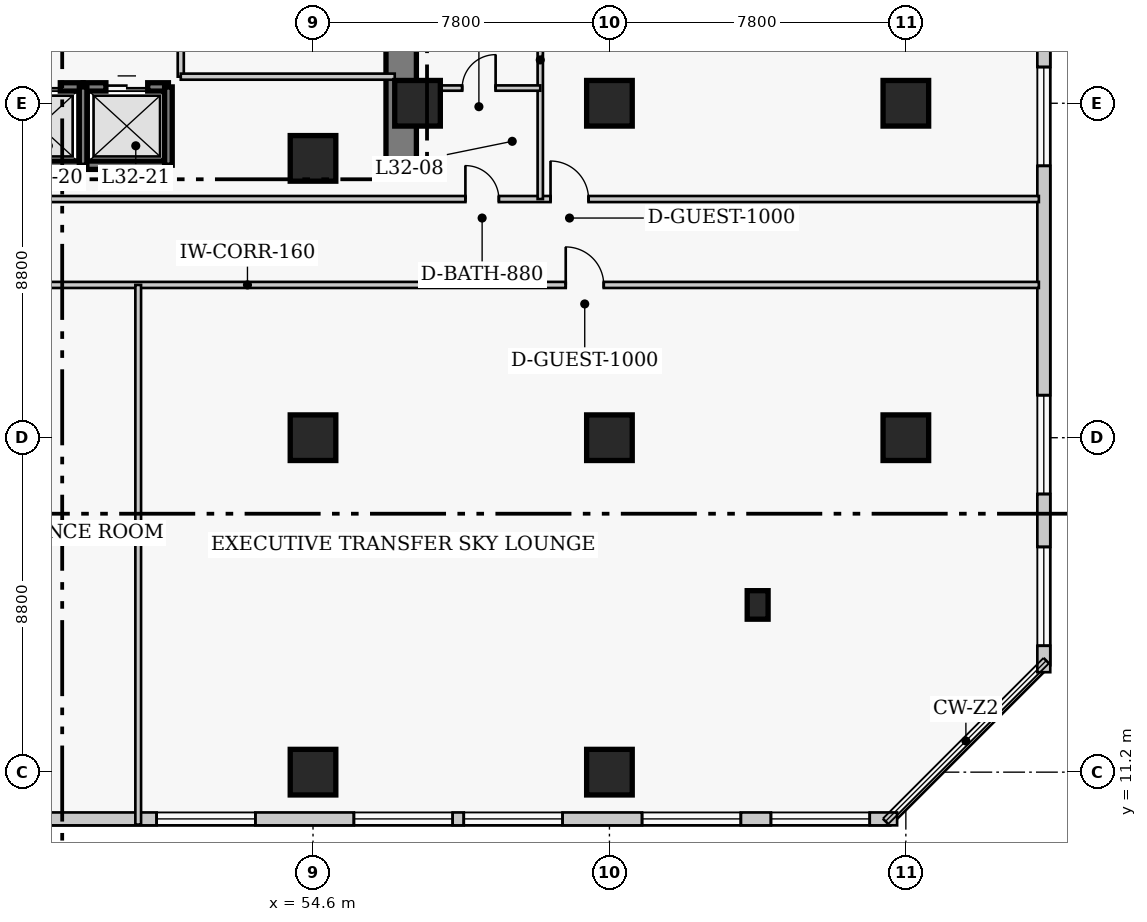
"""IFC4 building model, lengths in metres.
Left out: names, types, materials, properties, quantities, classifications, styles, units other than length and angle.
Written with IfcOpenShell. Run it as: python <this file> out.ifc"""

import sys

from ifc_helpers import new_model, si_unit, direction, frame, frame_2d, origin, origin_2d, place, context, subcontext, project, spatial, rectangle, extrude, element, fill, save


model = new_model("IFC4")
c1 = context("Model", 3, precision=1e-05, world=origin(), true_north=direction((0.0, 1.0)))
c2 = subcontext(c1, "Body", "Model", "MODEL_VIEW")
j1 = project(units=[si_unit("LENGTHUNIT", "METRE"), si_unit("PLANEANGLEUNIT", "RADIAN")], contexts=[c1])
p1 = place(None, origin())
s1 = spatial("IfcSite", under=j1, at=p1, CompositionType="ELEMENT")
p2 = place(p1, origin())
s2 = spatial("IfcBuilding", under=s1, at=p2, CompositionType="ELEMENT")
p3 = place(p2, frame((0.0, 0.0, 129.8)))
s3 = spatial("IfcBuildingStorey", under=s2, at=p3, CompositionType="ELEMENT", Elevation=129.8)
p4 = place(p3, frame((56.92, 27.05, 0.0), z_axis=(0.0, 0.0, 1.0), x_axis=(0.0, 1.0, 0.0)))
e1 = element("IfcWall", 1, at=p4, inside=s3, PredefinedType="SHEAR", context=c2, shape_type="SweptSolid", body=[
    extrude(rectangle(XDim=13.67, YDim=0.8, at=frame_2d((6.835, 0.0))), origin(), (0.0, 0.0, 1.0), 4.8),
])
for number, where, z_axis, x_axis in (
    (2, (54.6, 11.2, 0.0), (0.0, 0.0, 1.0), (1.0, 0.0, 0.0)),
    (3, (54.6, 20.0, 0.0), (0.0, 0.0, 1.0), (1.0, 0.0, 0.0)),
    (4, (62.4, 11.2, 0.0), (0.0, 0.0, 1.0), (1.0, 0.0, 0.0)),
    (5, (62.4, 20.0, 0.0), (0.0, 0.0, 1.0), (1.0, 0.0, 0.0)),
    (6, (62.4, 28.8, 0.0), (0.0, 0.0, 1.0), (1.0, 0.0, 0.0)),
    (7, (70.2, 20.0, 0.0), (0.0, 0.0, 1.0), (1.0, 0.0, 0.0)),
    (8, (70.2, 28.8, 0.0), (0.0, 0.0, 1.0), (1.0, 0.0, 0.0)),
    (9, (57.35, 28.8, 0.0), (0.0, 0.0, 1.0), (1.0, 0.0, 0.0)),
    (10, (54.6, 27.35, 0.0), (0.0, 0.0, 1.0), (1.0, 0.0, 0.0)),
):
    element("IfcColumn", number, at=place(p3, frame(where, z_axis=z_axis, x_axis=x_axis)), inside=s3, PredefinedType="COLUMN", context=c2, shape_type="SweptSolid", body=[
        extrude(rectangle(XDim=1.2, YDim=1.2, at=origin_2d()), origin(), (0.0, 0.0, 1.0), 4.8),
    ])
p5 = place(p3, frame((66.3, 15.6, 0.0), z_axis=(0.0, 0.0, 1.0), x_axis=(1.0, 0.0, 0.0)))
e11 = element("IfcColumn", 11, at=p5, inside=s3, PredefinedType="PILASTER", context=c2, shape_type="SweptSolid", body=[
    extrude(rectangle(XDim=0.55, YDim=0.75, at=origin_2d()), origin(), (0.0, 0.0, 1.0), 4.8),
])
p6 = place(p3, frame((41.68, 9.97, 0.0), z_axis=(0.0, 0.0, 1.0), x_axis=(1.0, 0.0, 0.0)))
e12 = element("IfcWall", 12, at=p6, inside=s3, PredefinedType="SOLIDWALL", context=c2, shape_type="SweptSolid", body=[
    extrude(rectangle(XDim=28.29, YDim=0.34, at=frame_2d((14.145, 0.0))), origin(), (0.0, 0.0, 1.0), 4.55),
])
p7 = place(p6, frame((0.721, 0.0, 0.65)))
e13 = element("IfcOpeningElement", 13, at=p7, cuts=e12, PredefinedType="OPENING", context=c2, shape_type="SweptSolid", body=[
    extrude(rectangle(XDim=2.6, YDim=2.2, at=frame_2d((1.3, 1.1))), frame((0.0, 0.18, 0.0), z_axis=(0.0, -1.0, 0.0), x_axis=(1.0, 0.0, 0.0)), (0.0, 0.0, 1.0), 0.36),
])
p8 = place(p6, frame((8.804, 0.0, 0.65)))
e14 = element("IfcOpeningElement", 14, at=p8, cuts=e12, PredefinedType="OPENING", context=c2, shape_type="SweptSolid", body=[
    extrude(rectangle(XDim=2.6, YDim=2.2, at=frame_2d((1.3, 1.1))), frame((0.0, 0.18, 0.0), z_axis=(0.0, -1.0, 0.0), x_axis=(1.0, 0.0, 0.0)), (0.0, 0.0, 1.0), 0.36),
])
p9 = place(p6, frame((13.995, 0.0, 0.65)))
e15 = element("IfcOpeningElement", 15, at=p9, cuts=e12, PredefinedType="OPENING", context=c2, shape_type="SweptSolid", body=[
    extrude(rectangle(XDim=2.6, YDim=2.2, at=frame_2d((1.3, 1.1))), frame((0.0, 0.18, 0.0), z_axis=(0.0, -1.0, 0.0), x_axis=(1.0, 0.0, 0.0)), (0.0, 0.0, 1.0), 0.36),
])
p10 = place(p6, frame((16.886, 0.0, 0.65)))
e16 = element("IfcOpeningElement", 16, at=p10, cuts=e12, PredefinedType="OPENING", context=c2, shape_type="SweptSolid", body=[
    extrude(rectangle(XDim=2.6, YDim=2.2, at=frame_2d((1.3, 1.1))), frame((0.0, 0.18, 0.0), z_axis=(0.0, -1.0, 0.0), x_axis=(1.0, 0.0, 0.0)), (0.0, 0.0, 1.0), 0.36),
])
p11 = place(p6, frame((21.578, 0.0, 0.65)))
e17 = element("IfcOpeningElement", 17, at=p11, cuts=e12, PredefinedType="OPENING", context=c2, shape_type="SweptSolid", body=[
    extrude(rectangle(XDim=2.6, YDim=2.2, at=frame_2d((1.3, 1.1))), frame((0.0, 0.18, 0.0), z_axis=(0.0, -1.0, 0.0), x_axis=(1.0, 0.0, 0.0)), (0.0, 0.0, 1.0), 0.36),
])
p12 = place(p6, frame((24.969, 0.0, 0.65)))
e18 = element("IfcOpeningElement", 18, at=p12, cuts=e12, PredefinedType="OPENING", context=c2, shape_type="SweptSolid", body=[
    extrude(rectangle(XDim=2.6, YDim=2.2, at=frame_2d((1.3, 1.1))), frame((0.0, 0.18, 0.0), z_axis=(0.0, -1.0, 0.0), x_axis=(1.0, 0.0, 0.0)), (0.0, 0.0, 1.0), 0.36),
])
p13 = place(p3, frame((73.83, 13.83, 0.0), z_axis=(0.0, 0.0, 1.0), x_axis=(0.0, 1.0, 0.0)))
e19 = element("IfcWall", 19, at=p13, inside=s3, PredefinedType="SOLIDWALL", context=c2, shape_type="SweptSolid", body=[
    extrude(rectangle(XDim=31.94, YDim=0.34, at=frame_2d((15.97, 0.0))), origin(), (0.0, 0.0, 1.0), 4.55),
])
p14 = place(p13, frame((0.696, 0.0, 0.65)))
e20 = element("IfcOpeningElement", 20, at=p14, cuts=e19, PredefinedType="OPENING", context=c2, shape_type="SweptSolid", body=[
    extrude(rectangle(XDim=2.6, YDim=2.2, at=frame_2d((1.3, 1.1))), frame((0.0, 0.18, 0.0), z_axis=(0.0, -1.0, 0.0), x_axis=(1.0, 0.0, 0.0)), (0.0, 0.0, 1.0), 0.36),
])
p15 = place(p13, frame((4.689, 0.0, 0.65)))
e21 = element("IfcOpeningElement", 21, at=p15, cuts=e19, PredefinedType="OPENING", context=c2, shape_type="SweptSolid", body=[
    extrude(rectangle(XDim=2.6, YDim=2.2, at=frame_2d((1.3, 1.1))), frame((0.0, 0.18, 0.0), z_axis=(0.0, -1.0, 0.0), x_axis=(1.0, 0.0, 0.0)), (0.0, 0.0, 1.0), 0.36),
])
p16 = place(p13, frame((13.324, 0.0, 0.65)))
e22 = element("IfcOpeningElement", 22, at=p16, cuts=e19, PredefinedType="OPENING", context=c2, shape_type="SweptSolid", body=[
    extrude(rectangle(XDim=2.6, YDim=2.2, at=frame_2d((1.3, 1.1))), frame((0.0, 0.18, 0.0), z_axis=(0.0, -1.0, 0.0), x_axis=(1.0, 0.0, 0.0)), (0.0, 0.0, 1.0), 0.36),
])
p17 = place(p13, frame((16.666, 0.0, 0.65)))
e23 = element("IfcOpeningElement", 23, at=p17, cuts=e19, PredefinedType="OPENING", context=c2, shape_type="SweptSolid", body=[
    extrude(rectangle(XDim=2.6, YDim=2.2, at=frame_2d((1.3, 1.1))), frame((0.0, 0.18, 0.0), z_axis=(0.0, -1.0, 0.0), x_axis=(1.0, 0.0, 0.0)), (0.0, 0.0, 1.0), 0.36),
])
p18 = place(p13, frame((20.659, 0.0, 0.65)))
e24 = element("IfcOpeningElement", 24, at=p18, cuts=e19, PredefinedType="OPENING", context=c2, shape_type="SweptSolid", body=[
    extrude(rectangle(XDim=2.6, YDim=2.2, at=frame_2d((1.3, 1.1))), frame((0.0, 0.18, 0.0), z_axis=(0.0, -1.0, 0.0), x_axis=(1.0, 0.0, 0.0)), (0.0, 0.0, 1.0), 0.36),
])
p19 = place(p13, frame((24.651, 0.0, 0.65)))
e25 = element("IfcOpeningElement", 25, at=p19, cuts=e19, PredefinedType="OPENING", context=c2, shape_type="SweptSolid", body=[
    extrude(rectangle(XDim=2.6, YDim=2.2, at=frame_2d((1.3, 1.1))), frame((0.0, 0.18, 0.0), z_axis=(0.0, -1.0, 0.0), x_axis=(1.0, 0.0, 0.0)), (0.0, 0.0, 1.0), 0.36),
])
p20 = place(p13, frame((28.644, 0.0, 0.65)))
e26 = element("IfcOpeningElement", 26, at=p20, cuts=e19, PredefinedType="OPENING", context=c2, shape_type="SweptSolid", body=[
    extrude(rectangle(XDim=2.6, YDim=2.2, at=frame_2d((1.3, 1.1))), frame((0.0, 0.18, 0.0), z_axis=(0.0, -1.0, 0.0), x_axis=(1.0, 0.0, 0.0)), (0.0, 0.0, 1.0), 0.36),
])
p21 = place(p3, frame((46.25, 29.23, 0.0), z_axis=(0.0, 0.0, 1.0), x_axis=(1.0, 0.0, 0.0)))
e27 = element("IfcWall", 27, at=p21, inside=s3, PredefinedType="SHEAR", context=c2, shape_type="SweptSolid", body=[
    extrude(rectangle(XDim=2.3, YDim=0.22, at=frame_2d((1.15, 0.0))), origin(), (0.0, 0.0, 1.0), 4.8),
])
p22 = place(p21, frame((0.6, 0.0, 0.0)))
e28 = element("IfcOpeningElement", 28, at=p22, cuts=e27, PredefinedType="OPENING", context=c2, shape_type="SweptSolid", body=[
    extrude(rectangle(XDim=1.1, YDim=2.15, at=frame_2d((0.55, 1.075))), frame((0.0, 0.12, 0.0), z_axis=(0.0, -1.0, 0.0), x_axis=(1.0, 0.0, 0.0)), (0.0, 0.0, 1.0), 0.24),
])
p23 = place(p3, frame((46.25, 27.17, 0.0), z_axis=(0.0, 0.0, 1.0), x_axis=(1.0, 0.0, 0.0)))
e29 = element("IfcWall", 29, at=p23, inside=s3, PredefinedType="SHEAR", context=c2, shape_type="SweptSolid", body=[
    extrude(rectangle(XDim=2.3, YDim=0.22, at=frame_2d((1.15, 0.0))), origin(), (0.0, 0.0, 1.0), 4.8),
])
p24 = place(p3, frame((48.55, 29.23, 0.0), z_axis=(0.0, 0.0, 1.0), x_axis=(1.0, 0.0, 0.0)))
e30 = element("IfcWall", 30, at=p24, inside=s3, PredefinedType="SHEAR", context=c2, shape_type="SweptSolid", body=[
    extrude(rectangle(XDim=2.245, YDim=0.22, at=frame_2d((1.123, 0.0))), origin(), (0.0, 0.0, 1.0), 4.8),
])
p25 = place(p24, frame((0.6, 0.0, 0.0)))
e31 = element("IfcOpeningElement", 31, at=p25, cuts=e30, PredefinedType="OPENING", context=c2, shape_type="SweptSolid", body=[
    extrude(rectangle(XDim=1.1, YDim=2.15, at=frame_2d((0.55, 1.075))), frame((0.0, 0.12, 0.0), z_axis=(0.0, -1.0, 0.0), x_axis=(1.0, 0.0, 0.0)), (0.0, 0.0, 1.0), 0.24),
])
p26 = place(p3, frame((48.55, 27.17, 0.0), z_axis=(0.0, 0.0, 1.0), x_axis=(1.0, 0.0, 0.0)))
e32 = element("IfcWall", 32, at=p26, inside=s3, PredefinedType="SHEAR", context=c2, shape_type="SweptSolid", body=[
    extrude(rectangle(XDim=2.245, YDim=0.22, at=frame_2d((1.123, 0.0))), origin(), (0.0, 0.0, 1.0), 4.8),
])
for number, where, z_axis, x_axis in (
    (33, (48.55, 27.17, 0.0), (0.0, 0.0, 1.0), (0.0, 1.0, 0.0)),
    (34, (50.795, 27.17, 0.0), (0.0, 0.0, 1.0), (0.0, 1.0, 0.0)),
):
    element("IfcWall", number, at=place(p3, frame(where, z_axis=z_axis, x_axis=x_axis)), inside=s3, PredefinedType="SHEAR", context=c2, shape_type="SweptSolid", body=[
        extrude(rectangle(XDim=2.06, YDim=0.2, at=frame_2d((1.03, 0.0))), origin(), (0.0, 0.0, 1.0), 4.8),
    ])
p27 = place(p3, frame((51.12, 29.5, 0.0), z_axis=(0.0, 0.0, 1.0), x_axis=(0.0, 1.0, 0.0)))
e35 = element("IfcWall", 35, at=p27, inside=s3, PredefinedType="PARTITIONING", context=c2, shape_type="SweptSolid", body=[
    extrude(rectangle(XDim=3.7, YDim=0.16, at=frame_2d((1.85, 0.0))), origin(), (0.0, 0.0, 1.0), 4.55),
])
p28 = place(p27, frame((0.9, 0.0, 0.0)))
e36 = element("IfcOpeningElement", 36, at=p28, cuts=e35, PredefinedType="OPENING", context=c2, shape_type="SweptSolid", body=[
    extrude(rectangle(XDim=1.1, YDim=2.15, at=frame_2d((0.55, 1.075))), frame((0.0, 0.09, 0.0), z_axis=(0.0, -1.0, 0.0), x_axis=(1.0, 0.0, 0.0)), (0.0, 0.0, 1.0), 0.18),
])
p29 = place(p3, frame((51.12, 29.5, 0.0), z_axis=(0.0, 0.0, 1.0), x_axis=(1.0, 0.0, 0.0)))
e37 = element("IfcWall", 37, at=p29, inside=s3, PredefinedType="PARTITIONING", context=c2, shape_type="SweptSolid", body=[
    extrude(rectangle(XDim=5.63, YDim=0.16, at=frame_2d((2.815, 0.0))), origin(), (0.0, 0.0, 1.0), 4.55),
])
p30 = place(p3, frame((4.3, 24.02, 0.0), z_axis=(0.0, 0.0, 1.0), x_axis=(1.0, 0.0, 0.0)))
e38 = element("IfcWall", 38, at=p30, inside=s3, PredefinedType="PARTITIONING", context=c2, shape_type="SweptSolid", body=[
    extrude(rectangle(XDim=69.4, YDim=0.16, at=frame_2d((34.7, 0.0))), origin(), (0.0, 0.0, 1.0), 4.55),
])
p31 = place(p30, frame((8.45, 0.0, 0.0)))
e39 = element("IfcOpeningElement", 39, at=p31, cuts=e38, PredefinedType="OPENING", context=c2, shape_type="SweptSolid", body=[
    extrude(rectangle(XDim=1.0, YDim=2.15, at=frame_2d((0.5, 1.075))), frame((0.0, 0.09, 0.0), z_axis=(0.0, -1.0, 0.0), x_axis=(1.0, 0.0, 0.0)), (0.0, 0.0, 1.0), 0.18),
])
p32 = place(p30, frame((25.2, 0.0, 0.0)))
e40 = element("IfcOpeningElement", 40, at=p32, cuts=e38, PredefinedType="OPENING", context=c2, shape_type="SweptSolid", body=[
    extrude(rectangle(XDim=1.0, YDim=2.15, at=frame_2d((0.5, 1.075))), frame((0.0, 0.09, 0.0), z_axis=(0.0, -1.0, 0.0), x_axis=(1.0, 0.0, 0.0)), (0.0, 0.0, 1.0), 0.18),
])
p33 = place(p30, frame((39.2, 0.0, 0.0)))
e41 = element("IfcOpeningElement", 41, at=p33, cuts=e38, PredefinedType="OPENING", context=c2, shape_type="SweptSolid", body=[
    extrude(rectangle(XDim=1.0, YDim=2.15, at=frame_2d((0.5, 1.075))), frame((0.0, 0.09, 0.0), z_axis=(0.0, -1.0, 0.0), x_axis=(1.0, 0.0, 0.0)), (0.0, 0.0, 1.0), 0.18),
])
p34 = place(p30, frame((56.95, 0.0, 0.0)))
e42 = element("IfcOpeningElement", 42, at=p34, cuts=e38, PredefinedType="OPENING", context=c2, shape_type="SweptSolid", body=[
    extrude(rectangle(XDim=1.0, YDim=2.15, at=frame_2d((0.5, 1.075))), frame((0.0, 0.09, 0.0), z_axis=(0.0, -1.0, 0.0), x_axis=(1.0, 0.0, 0.0)), (0.0, 0.0, 1.0), 0.18),
])
p35 = place(p3, frame((4.3, 26.28, 0.0), z_axis=(0.0, 0.0, 1.0), x_axis=(1.0, 0.0, 0.0)))
e43 = element("IfcWall", 43, at=p35, inside=s3, PredefinedType="PARTITIONING", context=c2, shape_type="SweptSolid", body=[
    extrude(rectangle(XDim=69.4, YDim=0.16, at=frame_2d((34.7, 0.0))), origin(), (0.0, 0.0, 1.0), 4.55),
])
p36 = place(p35, frame((32.8, 0.0, 0.0)))
e44 = element("IfcOpeningElement", 44, at=p36, cuts=e43, PredefinedType="OPENING", context=c2, shape_type="SweptSolid", body=[
    extrude(rectangle(XDim=1.8, YDim=2.2, at=frame_2d((0.9, 1.1))), frame((0.0, 0.09, 0.0), z_axis=(0.0, -1.0, 0.0), x_axis=(1.0, 0.0, 0.0)), (0.0, 0.0, 1.0), 0.18),
])
p37 = place(p35, frame((8.25, 0.0, 0.0)))
e45 = element("IfcOpeningElement", 45, at=p37, cuts=e43, PredefinedType="OPENING", context=c2, shape_type="SweptSolid", body=[
    extrude(rectangle(XDim=1.0, YDim=2.15, at=frame_2d((0.5, 1.075))), frame((0.0, 0.09, 0.0), z_axis=(0.0, -1.0, 0.0), x_axis=(1.0, 0.0, 0.0)), (0.0, 0.0, 1.0), 0.18),
])
p38 = place(p35, frame((54.31, 0.0, 0.0)))
e46 = element("IfcOpeningElement", 46, at=p38, cuts=e43, PredefinedType="OPENING", context=c2, shape_type="SweptSolid", body=[
    extrude(rectangle(XDim=0.88, YDim=2.05, at=frame_2d((0.44, 1.025))), frame((0.0, 0.09, 0.0), z_axis=(0.0, -1.0, 0.0), x_axis=(1.0, 0.0, 0.0)), (0.0, 0.0, 1.0), 0.18),
])
p39 = place(p35, frame((56.55, 0.0, 0.0)))
e47 = element("IfcOpeningElement", 47, at=p39, cuts=e43, PredefinedType="OPENING", context=c2, shape_type="SweptSolid", body=[
    extrude(rectangle(XDim=1.0, YDim=2.15, at=frame_2d((0.5, 1.075))), frame((0.0, 0.09, 0.0), z_axis=(0.0, -1.0, 0.0), x_axis=(1.0, 0.0, 0.0)), (0.0, 0.0, 1.0), 0.18),
])
p40 = place(p3, frame((50.0, 9.82, 0.0), z_axis=(0.0, 0.0, 1.0), x_axis=(0.0, 1.0, 0.0)))
e48 = element("IfcWall", 48, at=p40, inside=s3, PredefinedType="PARTITIONING", context=c2, shape_type="SweptSolid", body=[
    extrude(rectangle(XDim=14.2, YDim=0.15, at=frame_2d((7.1, 0.0))), origin(), (0.0, 0.0, 1.0), 4.053),
])
p41 = place(p3, frame((60.58, 26.28, 0.0), z_axis=(0.0, 0.0, 1.0), x_axis=(0.0, 1.0, 0.0)))
e49 = element("IfcWall", 49, at=p41, inside=s3, PredefinedType="PLUMBINGWALL", context=c2, shape_type="SweptSolid", body=[
    extrude(rectangle(XDim=7.32, YDim=0.14, at=frame_2d((3.66, 0.0))), origin(), (0.0, 0.0, 1.0), 4.55),
])
p42 = place(p3, frame((57.35, 29.2, 0.0), z_axis=(0.0, 0.0, 1.0), x_axis=(1.0, 0.0, 0.0)))
e50 = element("IfcWall", 50, at=p42, inside=s3, PredefinedType="PLUMBINGWALL", context=c2, shape_type="SweptSolid", body=[
    extrude(rectangle(XDim=3.23, YDim=0.14, at=frame_2d((1.615, 0.0))), origin(), (0.0, 0.0, 1.0), 4.55),
])
p43 = place(p42, frame((1.175, 0.0, 0.0)))
e51 = element("IfcOpeningElement", 51, at=p43, cuts=e50, PredefinedType="OPENING", context=c2, shape_type="SweptSolid", body=[
    extrude(rectangle(XDim=0.88, YDim=2.05, at=frame_2d((0.44, 1.025))), frame((0.0, 0.08, 0.0), z_axis=(0.0, -1.0, 0.0), x_axis=(1.0, 0.0, 0.0)), (0.0, 0.0, 1.0), 0.16),
])
p44 = place(p8, origin())
e52 = element("IfcWindow", 52, at=p44, inside=s3, PartitioningType="SINGLE_PANEL", PredefinedType="WINDOW", context=c2, shape_type="SweptSolid", body=[
    extrude(rectangle(XDim=2.6, YDim=2.2, at=frame_2d((1.3, 1.1))), frame((0.0, 0.03, 0.0), z_axis=(0.0, -1.0, 0.0), x_axis=(1.0, 0.0, 0.0)), (0.0, 0.0, 1.0), 0.06),
])
fill(e14, e52)
p45 = place(p9, origin())
e53 = element("IfcWindow", 53, at=p45, inside=s3, PartitioningType="SINGLE_PANEL", PredefinedType="WINDOW", context=c2, shape_type="SweptSolid", body=[
    extrude(rectangle(XDim=2.6, YDim=2.2, at=frame_2d((1.3, 1.1))), frame((0.0, 0.03, 0.0), z_axis=(0.0, -1.0, 0.0), x_axis=(1.0, 0.0, 0.0)), (0.0, 0.0, 1.0), 0.06),
])
fill(e15, e53)
p46 = place(p10, origin())
e54 = element("IfcWindow", 54, at=p46, inside=s3, PartitioningType="SINGLE_PANEL", PredefinedType="WINDOW", context=c2, shape_type="SweptSolid", body=[
    extrude(rectangle(XDim=2.6, YDim=2.2, at=frame_2d((1.3, 1.1))), frame((0.0, 0.03, 0.0), z_axis=(0.0, -1.0, 0.0), x_axis=(1.0, 0.0, 0.0)), (0.0, 0.0, 1.0), 0.06),
])
fill(e16, e54)
p47 = place(p11, origin())
e55 = element("IfcWindow", 55, at=p47, inside=s3, PartitioningType="SINGLE_PANEL", PredefinedType="WINDOW", context=c2, shape_type="SweptSolid", body=[
    extrude(rectangle(XDim=2.6, YDim=2.2, at=frame_2d((1.3, 1.1))), frame((0.0, 0.03, 0.0), z_axis=(0.0, -1.0, 0.0), x_axis=(1.0, 0.0, 0.0)), (0.0, 0.0, 1.0), 0.06),
])
fill(e17, e55)
p48 = place(p12, origin())
e56 = element("IfcWindow", 56, at=p48, inside=s3, PartitioningType="SINGLE_PANEL", PredefinedType="WINDOW", context=c2, shape_type="SweptSolid", body=[
    extrude(rectangle(XDim=2.6, YDim=2.2, at=frame_2d((1.3, 1.1))), frame((0.0, 0.03, 0.0), z_axis=(0.0, -1.0, 0.0), x_axis=(1.0, 0.0, 0.0)), (0.0, 0.0, 1.0), 0.06),
])
fill(e18, e56)
p49 = place(p14, origin())
e57 = element("IfcWindow", 57, at=p49, inside=s3, PartitioningType="SINGLE_PANEL", PredefinedType="WINDOW", context=c2, shape_type="SweptSolid", body=[
    extrude(rectangle(XDim=2.6, YDim=2.2, at=frame_2d((1.3, 1.1))), frame((0.0, 0.03, 0.0), z_axis=(0.0, -1.0, 0.0), x_axis=(1.0, 0.0, 0.0)), (0.0, 0.0, 1.0), 0.06),
])
fill(e20, e57)
p50 = place(p15, origin())
e58 = element("IfcWindow", 58, at=p50, inside=s3, PartitioningType="SINGLE_PANEL", PredefinedType="WINDOW", context=c2, shape_type="SweptSolid", body=[
    extrude(rectangle(XDim=2.6, YDim=2.2, at=frame_2d((1.3, 1.1))), frame((0.0, 0.03, 0.0), z_axis=(0.0, -1.0, 0.0), x_axis=(1.0, 0.0, 0.0)), (0.0, 0.0, 1.0), 0.06),
])
fill(e21, e58)
p51 = place(p16, origin())
e59 = element("IfcWindow", 59, at=p51, inside=s3, PartitioningType="SINGLE_PANEL", PredefinedType="WINDOW", context=c2, shape_type="SweptSolid", body=[
    extrude(rectangle(XDim=2.6, YDim=2.2, at=frame_2d((1.3, 1.1))), frame((0.0, 0.03, 0.0), z_axis=(0.0, -1.0, 0.0), x_axis=(1.0, 0.0, 0.0)), (0.0, 0.0, 1.0), 0.06),
])
fill(e22, e59)
p52 = place(p22, origin())
e60 = element("IfcDoor", 60, at=p52, inside=s3, OperationType="DOUBLE_DOOR_SLIDING", PredefinedType="DOOR", context=c2, shape_type="SweptSolid", body=[
    extrude(rectangle(XDim=1.1, YDim=2.15, at=frame_2d((0.55, 1.075))), frame((0.0, 0.025, 0.0), z_axis=(0.0, -1.0, 0.0), x_axis=(1.0, 0.0, 0.0)), (0.0, 0.0, 1.0), 0.05),
])
fill(e28, e60)
p53 = place(p25, origin())
e61 = element("IfcDoor", 61, at=p53, inside=s3, OperationType="DOUBLE_DOOR_SLIDING", PredefinedType="DOOR", context=c2, shape_type="SweptSolid", body=[
    extrude(rectangle(XDim=1.1, YDim=2.15, at=frame_2d((0.55, 1.075))), frame((0.0, 0.025, 0.0), z_axis=(0.0, -1.0, 0.0), x_axis=(1.0, 0.0, 0.0)), (0.0, 0.0, 1.0), 0.05),
])
fill(e31, e61)
p54 = place(p34, origin())
e62 = element("IfcDoor", 62, at=p54, inside=s3, OperationType="SINGLE_SWING_LEFT", PredefinedType="DOOR", context=c2, shape_type="SweptSolid", body=[
    extrude(rectangle(XDim=1.0, YDim=2.15, at=frame_2d((0.5, 1.075))), frame((0.0, 0.025, 0.0), z_axis=(0.0, -1.0, 0.0), x_axis=(1.0, 0.0, 0.0)), (0.0, 0.0, 1.0), 0.05),
])
fill(e42, e62)
p55 = place(p38, origin())
e63 = element("IfcDoor", 63, at=p55, inside=s3, OperationType="SINGLE_SWING_LEFT", PredefinedType="DOOR", context=c2, shape_type="SweptSolid", body=[
    extrude(rectangle(XDim=0.88, YDim=2.05, at=frame_2d((0.44, 1.025))), frame((0.0, 0.025, 0.0), z_axis=(0.0, -1.0, 0.0), x_axis=(1.0, 0.0, 0.0)), (0.0, 0.0, 1.0), 0.05),
])
fill(e46, e63)
p56 = place(p43, origin())
e64 = element("IfcDoor", 64, at=p56, inside=s3, OperationType="SINGLE_SWING_RIGHT", PredefinedType="DOOR", context=c2, shape_type="SweptSolid", body=[
    extrude(rectangle(XDim=0.88, YDim=2.05, at=frame_2d((0.44, 1.025))), frame((0.0, 0.025, 0.0), z_axis=(0.0, -1.0, 0.0), x_axis=(1.0, 0.0, 0.0)), (0.0, 0.0, 1.0), 0.05),
])
fill(e51, e64)
p57 = place(p39, origin())
e65 = element("IfcDoor", 65, at=p57, inside=s3, OperationType="SINGLE_SWING_LEFT", PredefinedType="DOOR", context=c2, shape_type="SweptSolid", body=[
    extrude(rectangle(XDim=1.0, YDim=2.15, at=frame_2d((0.5, 1.075))), frame((0.0, 0.025, 0.0), z_axis=(0.0, -1.0, 0.0), x_axis=(1.0, 0.0, 0.0)), (0.0, 0.0, 1.0), 0.05),
])
fill(e47, e65)
save(model, sys.argv[1])
